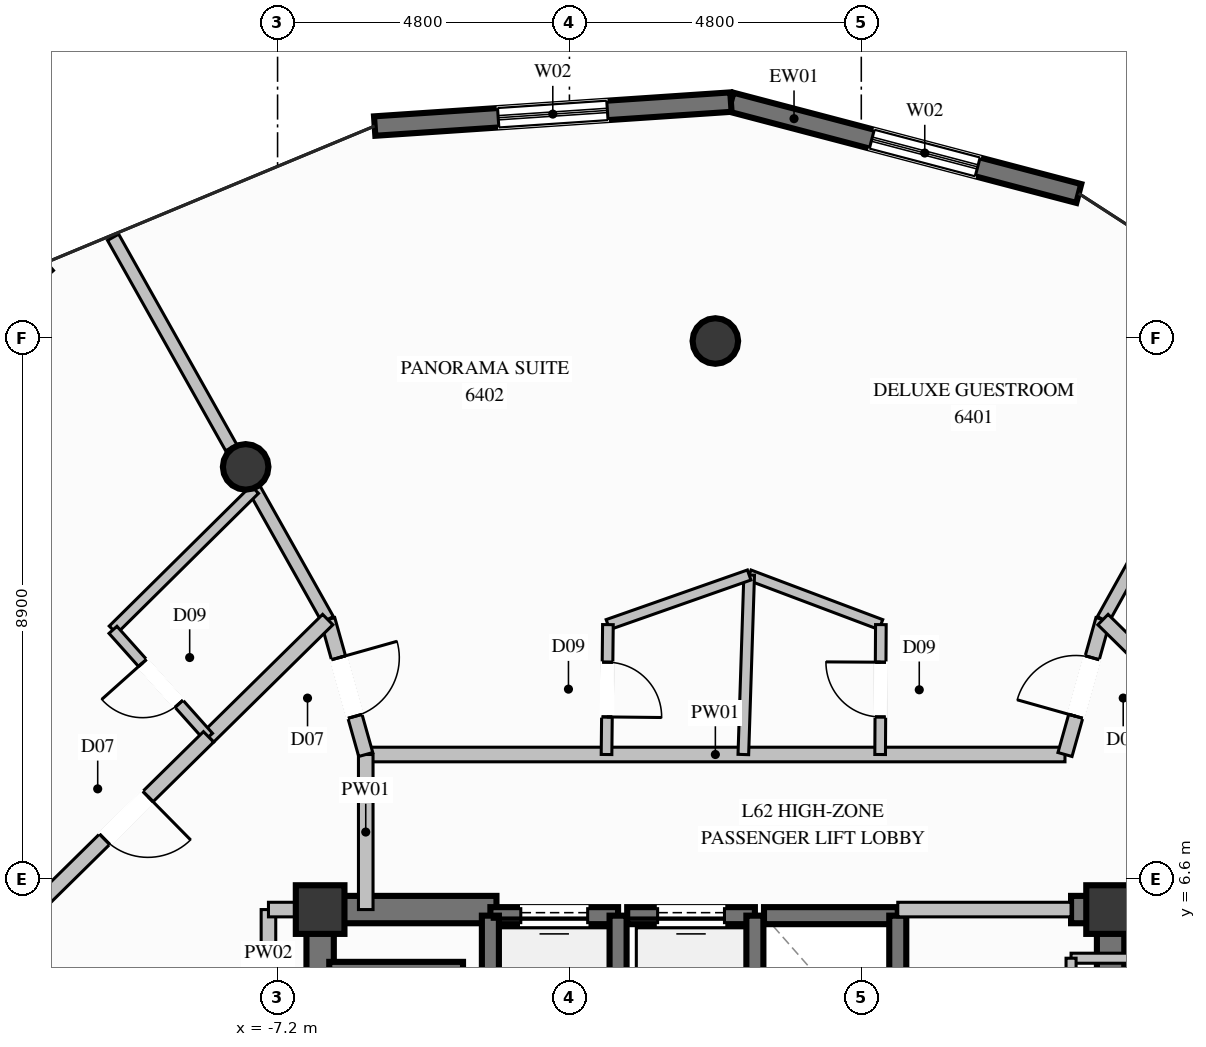
"""IFC4 building model, lengths in metres.
Left out: names, types, materials, properties, quantities, classifications, styles, units other than length and angle.
Written with IfcOpenShell. Run it as: python <this file> out.ifc"""

import sys

from ifc_helpers import new_model, si_unit, direction, frame, frame_2d, origin, origin_2d, place, context, subcontext, project, spatial, rectangle, circle, extrude, element, fill, save


model = new_model("IFC4")
c1 = context("Model", 3, precision=1e-05, world=origin(), true_north=direction((0.0, 1.0)))
c2 = subcontext(c1, "Body", "Model", "MODEL_VIEW")
j1 = project(units=[si_unit("LENGTHUNIT", "METRE"), si_unit("PLANEANGLEUNIT", "RADIAN")], contexts=[c1])
p1 = place(None, origin())
s1 = spatial("IfcSite", under=j1, at=p1, CompositionType="ELEMENT")
p2 = place(p1, origin())
s2 = spatial("IfcBuilding", under=s1, at=p2, CompositionType="ELEMENT")
p3 = place(p2, frame((0.0, 0.0, 239.2)))
s3 = spatial("IfcBuildingStorey", under=s2, at=p3, CompositionType="ELEMENT", Elevation=239.2)
for number, where, z_axis, x_axis in (
    (1, (6.5, 6.1, 0.0), (0.0, 0.0, 1.0), (1.0, 0.0, 0.0)),
    (2, (-6.5, 6.1, 0.0), (0.0, 0.0, 1.0), (1.0, 0.0, 0.0)),
):
    element("IfcColumn", number, at=place(p3, frame(where, z_axis=z_axis, x_axis=x_axis)), inside=s3, PredefinedType="COLUMN", context=c2, shape_type="SweptSolid", body=[
        extrude(rectangle(XDim=0.8, YDim=0.8, at=origin_2d()), origin(), (0.0, 0.0, 1.0), 3.8),
    ])
p4 = place(p3, frame((-6.275, 6.1, 0.0), z_axis=(0.0, 0.0, 1.0), x_axis=(1.0, 0.0, 0.0)))
e3 = element("IfcWall", 3, at=p4, inside=s3, PredefinedType="SHEAR", context=c2, shape_type="SweptSolid", body=[
    extrude(rectangle(XDim=2.675, YDim=0.45, at=frame_2d((1.337, 0.0))), origin(), (0.0, 0.0, 1.0), 3.8),
])
p5 = place(p3, frame((5.85, 6.1, 0.0), z_axis=(0.0, 0.0, 1.0), x_axis=(1.0, 0.0, 0.0)))
e4 = element("IfcWall", 4, at=p5, inside=s3, PredefinedType="SHEAR", context=c2, shape_type="SweptSolid", body=[
    extrude(rectangle(XDim=0.425, YDim=0.45, at=frame_2d((0.212, 0.0))), origin(), (0.0, 0.0, 1.0), 3.8),
])
p6 = place(p3, frame((-6.5, 2.35, 0.0), z_axis=(0.0, 0.0, 1.0), x_axis=(0.0, 1.0, 0.0)))
e5 = element("IfcWall", 5, at=p6, inside=s3, PredefinedType="SHEAR", context=c2, shape_type="SweptSolid", body=[
    extrude(rectangle(XDim=3.975, YDim=0.45, at=frame_2d((1.987, 0.0))), origin(), (0.0, 0.0, 1.0), 3.8),
])
p7 = place(p3, frame((6.5, 3.35, 0.0), z_axis=(0.0, 0.0, 1.0), x_axis=(0.0, 1.0, 0.0)))
e6 = element("IfcWall", 6, at=p7, inside=s3, PredefinedType="SHEAR", context=c2, shape_type="SweptSolid", body=[
    extrude(rectangle(XDim=2.975, YDim=0.45, at=frame_2d((1.487, 0.0))), origin(), (0.0, 0.0, 1.0), 3.8),
])
for number, where, z_axis, x_axis in (
    (7, (0.0, 15.45, 0.0), (0.0, 0.0, 1.0), (1.0, 0.0, 0.0)),
    (8, (-7.725, 13.38, 0.0), (0.0, 0.0, 1.0), (1.0, 0.0, 0.0)),
):
    element("IfcColumn", number, at=place(p3, frame(where, z_axis=z_axis, x_axis=x_axis)), inside=s3, PredefinedType="COLUMN", context=c2, shape_type="SweptSolid", body=[
        extrude(circle(Radius=0.375, at=origin_2d()), origin(), (0.0, 0.0, 1.0), 3.8),
    ])
p8 = place(p3, frame((0.256, 19.379, 0.0), z_axis=(0.0, 0.0, 1.0), x_axis=(0.967181914063, -0.254084917124, 0.0)))
e9 = element("IfcWall", 9, at=p8, inside=s3, PredefinedType="SOLIDWALL", context=c2, shape_type="SweptSolid", body=[
    extrude(rectangle(XDim=5.915, YDim=0.32, at=frame_2d((2.958, 0.0))), origin(), (0.0, 0.0, 1.0), 3.57),
])
p9 = place(p8, frame((2.396, 0.0, 0.35)))
e10 = element("IfcOpeningElement", 10, at=p9, cuts=e9, PredefinedType="OPENING", context=c2, shape_type="SweptSolid", body=[
    extrude(rectangle(XDim=1.8, YDim=2.6, at=frame_2d((0.9, 1.3))), frame((0.0, 0.17, 0.0), z_axis=(0.0, -1.0, 0.0), x_axis=(1.0, 0.0, 0.0)), (0.0, 0.0, 1.0), 0.34),
])
p10 = place(p3, frame((-5.603, 18.985, 0.0), z_axis=(0.0, 0.0, 1.0), x_axis=(0.997748955427, 0.067059838539, 0.0)))
e11 = element("IfcWall", 11, at=p10, inside=s3, PredefinedType="SOLIDWALL", context=c2, shape_type="SweptSolid", body=[
    extrude(rectangle(XDim=5.872, YDim=0.32, at=frame_2d((2.936, 0.0))), origin(), (0.0, 0.0, 1.0), 3.57),
])
p11 = place(p10, frame((2.036, 0.0, 0.35)))
e12 = element("IfcOpeningElement", 12, at=p11, cuts=e11, PredefinedType="OPENING", context=c2, shape_type="SweptSolid", body=[
    extrude(rectangle(XDim=1.8, YDim=2.6, at=frame_2d((0.9, 1.3))), frame((0.0, 0.17, 0.0), z_axis=(0.0, -1.0, 0.0), x_axis=(1.0, 0.0, 0.0)), (0.0, 0.0, 1.0), 0.34),
])
p12 = place(p3, frame((-1.6, 6.0, 0.0), z_axis=(0.0, 0.0, 1.0), x_axis=(-1.0, 0.0, 0.0)))
e13 = element("IfcWall", 13, at=p12, inside=s3, PredefinedType="SOLIDWALL", context=c2, shape_type="SweptSolid", body=[
    extrude(rectangle(XDim=2.1, YDim=0.28, at=frame_2d((1.05, 0.0))), origin(), (0.0, 0.0, 1.0), 3.57),
])
p13 = place(p12, frame((0.5, 0.0, 0.0)))
e14 = element("IfcOpeningElement", 14, at=p13, cuts=e13, PredefinedType="OPENING", context=c2, shape_type="SweptSolid", body=[
    extrude(rectangle(XDim=1.1, YDim=2.2, at=frame_2d((0.55, 1.1))), frame((0.0, 0.15, 0.0), z_axis=(0.0, -1.0, 0.0), x_axis=(1.0, 0.0, 0.0)), (0.0, 0.0, 1.0), 0.3),
])
for number, where, z_axis, x_axis in (
    (15, (-3.7, 6.0, 0.0), (0.0, 0.0, 1.0), (0.0, -1.0, 0.0)),
    (16, (-1.6, 3.5, 0.0), (0.0, 0.0, 1.0), (0.0, 1.0, 0.0)),
):
    element("IfcWall", number, at=place(p3, frame(where, z_axis=z_axis, x_axis=x_axis)), inside=s3, PredefinedType="SOLIDWALL", context=c2, shape_type="SweptSolid", body=[
        extrude(rectangle(XDim=2.5, YDim=0.28, at=frame_2d((1.25, 0.0))), origin(), (0.0, 0.0, 1.0), 3.57),
    ])
p14 = place(p3, frame((0.65, 6.0, 0.0), z_axis=(0.0, 0.0, 1.0), x_axis=(-1.0, 0.0, 0.0)))
e17 = element("IfcWall", 17, at=p14, inside=s3, PredefinedType="SOLIDWALL", context=c2, shape_type="SweptSolid", body=[
    extrude(rectangle(XDim=2.1, YDim=0.28, at=frame_2d((1.05, 0.0))), origin(), (0.0, 0.0, 1.0), 3.57),
])
p15 = place(p14, frame((0.5, 0.0, 0.0)))
e18 = element("IfcOpeningElement", 18, at=p15, cuts=e17, PredefinedType="OPENING", context=c2, shape_type="SweptSolid", body=[
    extrude(rectangle(XDim=1.1, YDim=2.2, at=frame_2d((0.55, 1.1))), frame((0.0, 0.15, 0.0), z_axis=(0.0, -1.0, 0.0), x_axis=(1.0, 0.0, 0.0)), (0.0, 0.0, 1.0), 0.3),
])
p16 = place(p3, frame((0.65, 3.5, 0.0), z_axis=(0.0, 0.0, 1.0), x_axis=(0.0, 1.0, 0.0)))
e19 = element("IfcWall", 19, at=p16, inside=s3, PredefinedType="SOLIDWALL", context=c2, shape_type="SweptSolid", body=[
    extrude(rectangle(XDim=2.5, YDim=0.28, at=frame_2d((1.25, 0.0))), origin(), (0.0, 0.0, 1.0), 3.57),
])
p17 = place(p3, frame((3.0, 6.0, 0.0), z_axis=(0.0, 0.0, 1.0), x_axis=(-1.0, 0.0, 0.0)))
e20 = element("IfcWall", 20, at=p17, inside=s3, PredefinedType="SOLIDWALL", context=c2, shape_type="SweptSolid", body=[
    extrude(rectangle(XDim=2.2, YDim=0.28, at=frame_2d((1.1, 0.0))), origin(), (0.0, 0.0, 1.0), 3.57),
])
p18 = place(p3, frame((3.0, 3.5, 0.0), z_axis=(0.0, 0.0, 1.0), x_axis=(0.0, 1.0, 0.0)))
e21 = element("IfcWall", 21, at=p18, inside=s3, PredefinedType="SOLIDWALL", context=c2, shape_type="SweptSolid", body=[
    extrude(rectangle(XDim=2.5, YDim=0.28, at=frame_2d((1.25, 0.0))), origin(), (0.0, 0.0, 1.0), 3.57),
])
p19 = place(p3, frame((-4.15, 5.1, 0.0), z_axis=(0.0, 0.0, 1.0), x_axis=(-1.0, 0.0, 0.0)))
e22 = element("IfcWall", 22, at=p19, inside=s3, PredefinedType="SOLIDWALL", context=c2, shape_type="SweptSolid", body=[
    extrude(rectangle(XDim=2.2, YDim=0.28, at=frame_2d((1.1, 0.0))), origin(), (0.0, 0.0, 1.0), 3.57),
])
p20 = place(p3, frame((-5.75, 8.65, 0.0), z_axis=(0.0, 0.0, 1.0), x_axis=(1.0, 0.0, 0.0)))
e23 = element("IfcWall", 23, at=p20, inside=s3, PredefinedType="PARTITIONING", context=c2, shape_type="SweptSolid", body=[
    extrude(rectangle(XDim=11.5, YDim=0.24, at=frame_2d((5.75, 0.0))), origin(), (0.0, 0.0, 1.0), 3.57),
])
p21 = place(p3, frame((3.0, 6.1, 0.0), z_axis=(0.0, 0.0, 1.0), x_axis=(1.0, 0.0, 0.0)))
e24 = element("IfcWall", 24, at=p21, inside=s3, PredefinedType="PARTITIONING", context=c2, shape_type="SweptSolid", body=[
    extrude(rectangle(XDim=2.85, YDim=0.24, at=frame_2d((1.425, 0.0))), origin(), (0.0, 0.0, 1.0), 2.655),
])
p22 = place(p3, frame((6.5, 6.1, 0.0), z_axis=(0.0, 0.0, 1.0), x_axis=(1.0, 0.0, 0.0)))
e25 = element("IfcWall", 25, at=p22, inside=s3, PredefinedType="PARTITIONING", context=c2, shape_type="SweptSolid", body=[
    extrude(rectangle(XDim=0.85, YDim=0.24, at=frame_2d((0.425, 0.0))), origin(), (0.0, 0.0, 1.0), 3.011),
])
p23 = place(p3, frame((-5.75, 6.1, 0.0), z_axis=(0.0, 0.0, 1.0), x_axis=(0.0, 1.0, 0.0)))
e26 = element("IfcWall", 26, at=p23, inside=s3, PredefinedType="PARTITIONING", context=c2, shape_type="SweptSolid", body=[
    extrude(rectangle(XDim=2.55, YDim=0.24, at=frame_2d((1.275, 0.0))), origin(), (0.0, 0.0, 1.0), 3.57),
])
p24 = place(p3, frame((-7.35, 4.95, 0.0), z_axis=(0.0, 0.0, 1.0), x_axis=(0.0, 1.0, 0.0)))
e27 = element("IfcWall", 27, at=p24, inside=s3, PredefinedType="PARTITIONING", context=c2, shape_type="SweptSolid", body=[
    extrude(rectangle(XDim=1.15, YDim=0.24, at=frame_2d((0.575, 0.0))), origin(), (0.0, 0.0, 1.0), 2.655),
])
p25 = place(p3, frame((-7.35, 6.1, 0.0), z_axis=(0.0, 0.0, 1.0), x_axis=(1.0, 0.0, 0.0)))
e28 = element("IfcWall", 28, at=p25, inside=s3, PredefinedType="PARTITIONING", context=c2, shape_type="SweptSolid", body=[
    extrude(rectangle(XDim=0.85, YDim=0.24, at=frame_2d((0.425, 0.0))), origin(), (0.0, 0.0, 1.0), 3.011),
])
p26 = place(p3, frame((7.35, 5.3, 0.0), z_axis=(0.0, 0.0, 1.0), x_axis=(-1.0, 0.0, 0.0)))
e29 = element("IfcWall", 29, at=p26, inside=s3, PredefinedType="PARTITIONING", context=c2, shape_type="SweptSolid", body=[
    extrude(rectangle(XDim=1.5, YDim=0.165, at=frame_2d((0.75, 0.0))), origin(), (0.0, 0.0, 1.0), 2.655),
])
p27 = place(p3, frame((5.85, 5.3, 0.0), z_axis=(0.0, 0.0, 1.0), x_axis=(0.0, -1.0, 0.0)))
e30 = element("IfcWall", 30, at=p27, inside=s3, PredefinedType="PARTITIONING", context=c2, shape_type="SweptSolid", body=[
    extrude(rectangle(XDim=2.55, YDim=0.165, at=frame_2d((1.275, 0.0))), origin(), (0.0, 0.0, 1.0), 2.655),
])
p28 = place(p3, frame((6.375, 10.869, 0.0), z_axis=(0.0, 0.0, 1.0), x_axis=(0.486620940413, 0.873613221255, 0.0)))
e31 = element("IfcWall", 31, at=p28, inside=s3, PredefinedType="PARTITIONING", context=c2, shape_type="SweptSolid", body=[
    extrude(rectangle(XDim=2.458, YDim=0.21, at=frame_2d((1.229, 0.0))), origin(), (0.0, 0.0, 1.0), 3.011),
])
p29 = place(p3, frame((-6.375, 10.869, 0.0), z_axis=(0.0, 0.0, 1.0), x_axis=(-0.489667191284, 0.871909422922, 0.0)))
e32 = element("IfcWall", 32, at=p29, inside=s3, PredefinedType="PARTITIONING", context=c2, shape_type="SweptSolid", body=[
    extrude(rectangle(XDim=2.459, YDim=0.21, at=frame_2d((1.229, 0.0))), origin(), (0.0, 0.0, 1.0), 3.011),
])
p30 = place(p3, frame((-7.962, 13.696, 0.0), z_axis=(0.0, 0.0, 1.0), x_axis=(-0.489665242016, 0.871910517634, 0.0)))
e33 = element("IfcWall", 33, at=p30, inside=s3, PredefinedType="PARTITIONING", context=c2, shape_type="SweptSolid", body=[
    extrude(rectangle(XDim=3.968, YDim=0.21, at=frame_2d((1.984, 0.0))), origin(), (0.0, 0.0, 1.0), 3.57),
])
p31 = place(p3, frame((0.556, 11.602, 0.0), z_axis=(0.0, 0.0, 1.0), x_axis=(0.935773181831, -0.35260254135, 0.0)))
e34 = element("IfcWall", 34, at=p31, inside=s3, PredefinedType="PLUMBINGWALL", context=c2, shape_type="SweptSolid", body=[
    extrude(rectangle(XDim=2.315, YDim=0.175, at=frame_2d((1.157, 0.0))), origin(), (0.0, 0.0, 1.0), 3.253),
])
p32 = place(p3, frame((0.556, 11.602, 0.0), z_axis=(0.0, 0.0, 1.0), x_axis=(-0.032483675207, -0.999472266171, 0.0)))
e35 = element("IfcWall", 35, at=p32, inside=s3, PredefinedType="PLUMBINGWALL", context=c2, shape_type="SweptSolid", body=[
    extrude(rectangle(XDim=2.954, YDim=0.175, at=frame_2d((1.477, 0.0))), origin(), (0.0, 0.0, 1.0), 3.57),
])
p33 = place(p3, frame((2.71, 8.65, 0.0), z_axis=(0.0, 0.0, 1.0), x_axis=(0.005600552237, 0.999984316784, 0.0)))
e36 = element("IfcWall", 36, at=p33, inside=s3, PredefinedType="PLUMBINGWALL", context=c2, shape_type="SweptSolid", body=[
    extrude(rectangle(XDim=2.136, YDim=0.175, at=frame_2d((1.068, 0.0))), origin(), (0.0, 0.0, 1.0), 3.57),
])
p34 = place(p33, frame((0.618, 0.0, 0.0)))
e37 = element("IfcOpeningElement", 37, at=p34, cuts=e36, PredefinedType="OPENING", context=c2, shape_type="SweptSolid", body=[
    extrude(rectangle(XDim=0.9, YDim=2.1, at=frame_2d((0.45, 1.05))), frame((0.0, 0.098, 0.0), z_axis=(0.0, -1.0, 0.0), x_axis=(1.0, 0.0, 0.0)), (0.0, 0.0, 1.0), 0.195),
])
p35 = place(p3, frame((5.75, 8.65, 0.0), z_axis=(0.0, 0.0, 1.0), x_axis=(0.271110513922, 0.962548226969, 0.0)))
e38 = element("IfcWall", 38, at=p35, inside=s3, PredefinedType="PARTITIONING", context=c2, shape_type="SweptSolid", body=[
    extrude(rectangle(XDim=2.305, YDim=0.24, at=frame_2d((1.153, 0.0))), origin(), (0.0, 0.0, 1.0), 3.57),
])
p36 = place(p35, frame((0.653, 0.0, 0.0)))
e39 = element("IfcOpeningElement", 39, at=p36, cuts=e38, PredefinedType="OPENING", context=c2, shape_type="SweptSolid", body=[
    extrude(rectangle(XDim=1.0, YDim=2.2, at=frame_2d((0.5, 1.1))), frame((0.0, 0.13, 0.0), z_axis=(0.0, -1.0, 0.0), x_axis=(1.0, 0.0, 0.0)), (0.0, 0.0, 1.0), 0.26),
])
p37 = place(p3, frame((-1.767, 10.786, 0.0), z_axis=(0.0, 0.0, 1.0), x_axis=(0.943463492061, 0.331476453385, 0.0)))
e40 = element("IfcWall", 40, at=p37, inside=s3, PredefinedType="PLUMBINGWALL", context=c2, shape_type="SweptSolid", body=[
    extrude(rectangle(XDim=2.462, YDim=0.175, at=frame_2d((1.231, 0.0))), origin(), (0.0, 0.0, 1.0), 3.253),
])
p38 = place(p3, frame((-1.767, 10.786, 0.0), z_axis=(0.0, 0.0, 1.0), x_axis=(-0.010743464968, -0.999942287315, 0.0)))
e41 = element("IfcWall", 41, at=p38, inside=s3, PredefinedType="PLUMBINGWALL", context=c2, shape_type="SweptSolid", body=[
    extrude(rectangle(XDim=2.136, YDim=0.175, at=frame_2d((1.068, 0.0))), origin(), (0.0, 0.0, 1.0), 3.57),
])
p39 = place(p38, frame((0.618, 0.0, 0.0)))
e42 = element("IfcOpeningElement", 42, at=p39, cuts=e41, PredefinedType="OPENING", context=c2, shape_type="SweptSolid", body=[
    extrude(rectangle(XDim=0.9, YDim=2.1, at=frame_2d((0.45, 1.05))), frame((0.0, 0.098, 0.0), z_axis=(0.0, -1.0, 0.0), x_axis=(1.0, 0.0, 0.0)), (0.0, 0.0, 1.0), 0.195),
])
p40 = place(p3, frame((-6.375, 10.869, 0.0), z_axis=(0.0, 0.0, 1.0), x_axis=(0.271110513922, -0.962548226969, 0.0)))
e43 = element("IfcWall", 43, at=p40, inside=s3, PredefinedType="PARTITIONING", context=c2, shape_type="SweptSolid", body=[
    extrude(rectangle(XDim=2.305, YDim=0.24, at=frame_2d((1.153, 0.0))), origin(), (0.0, 0.0, 1.0), 3.57),
])
p41 = place(p40, frame((0.653, 0.0, 0.0)))
e44 = element("IfcOpeningElement", 44, at=p41, cuts=e43, PredefinedType="OPENING", context=c2, shape_type="SweptSolid", body=[
    extrude(rectangle(XDim=1.0, YDim=2.2, at=frame_2d((0.5, 1.1))), frame((0.0, 0.13, 0.0), z_axis=(0.0, -1.0, 0.0), x_axis=(1.0, 0.0, 0.0)), (0.0, 0.0, 1.0), 0.26),
])
p42 = place(p3, frame((-6.375, 10.869, 0.0), z_axis=(0.0, 0.0, 1.0), x_axis=(-0.712721806089, -0.701446809904, 0.0)))
e45 = element("IfcWall", 45, at=p42, inside=s3, PredefinedType="PARTITIONING", context=c2, shape_type="SweptSolid", body=[
    extrude(rectangle(XDim=2.75, YDim=0.24, at=frame_2d((1.375, 0.0))), origin(), (0.0, 0.0, 1.0), 3.57),
])
p43 = place(p3, frame((-7.575, 13.007, 0.0), z_axis=(0.0, 0.0, 1.0), x_axis=(-0.710892186869, -0.703301001456, 0.0)))
e46 = element("IfcWall", 46, at=p43, inside=s3, PredefinedType="PLUMBINGWALL", context=c2, shape_type="SweptSolid", body=[
    extrude(rectangle(XDim=3.281, YDim=0.175, at=frame_2d((1.64, 0.0))), origin(), (0.0, 0.0, 1.0), 3.139),
])
p44 = place(p3, frame((-8.335, 8.94, 0.0), z_axis=(0.0, 0.0, 1.0), x_axis=(-0.666153503552, 0.745814661766, 0.0)))
e47 = element("IfcWall", 47, at=p44, inside=s3, PredefinedType="PLUMBINGWALL", context=c2, shape_type="SweptSolid", body=[
    extrude(rectangle(XDim=2.36, YDim=0.175, at=frame_2d((1.18, 0.0))), origin(), (0.0, 0.0, 1.0), 3.57),
])
p45 = place(p44, frame((0.73, 0.0, 0.0)))
e48 = element("IfcOpeningElement", 48, at=p45, cuts=e47, PredefinedType="OPENING", context=c2, shape_type="SweptSolid", body=[
    extrude(rectangle(XDim=0.9, YDim=2.1, at=frame_2d((0.45, 1.05))), frame((0.0, 0.098, 0.0), z_axis=(0.0, -1.0, 0.0), x_axis=(1.0, 0.0, 0.0)), (0.0, 0.0, 1.0), 0.195),
])
p46 = place(p3, frame((-8.335, 8.94, 0.0), z_axis=(0.0, 0.0, 1.0), x_axis=(-0.712612295011, -0.701558063883, 0.0)))
e49 = element("IfcWall", 49, at=p46, inside=s3, PredefinedType="PARTITIONING", context=c2, shape_type="SweptSolid", body=[
    extrude(rectangle(XDim=3.799, YDim=0.24, at=frame_2d((1.899, 0.0))), origin(), (0.0, 0.0, 1.0), 3.57),
])
p47 = place(p46, frame((1.399, 0.0, 0.0)))
e50 = element("IfcOpeningElement", 50, at=p47, cuts=e49, PredefinedType="OPENING", context=c2, shape_type="SweptSolid", body=[
    extrude(rectangle(XDim=1.0, YDim=2.2, at=frame_2d((0.5, 1.1))), frame((0.0, 0.13, 0.0), z_axis=(0.0, -1.0, 0.0), x_axis=(1.0, 0.0, 0.0)), (0.0, 0.0, 1.0), 0.26),
])
p48 = place(p3, frame((9.082, 8.204, 0.0), z_axis=(0.0, 0.0, 1.0), x_axis=(-0.712644426178, 0.70152542494, 0.0)))
e51 = element("IfcWall", 51, at=p48, inside=s3, PredefinedType="PARTITIONING", context=c2, shape_type="SweptSolid", body=[
    extrude(rectangle(XDim=3.799, YDim=0.24, at=frame_2d((1.899, 0.0))), origin(), (0.0, 0.0, 1.0), 3.57),
])
p49 = place(p48, frame((1.399, 0.0, 0.0)))
e52 = element("IfcOpeningElement", 52, at=p49, cuts=e51, PredefinedType="OPENING", context=c2, shape_type="SweptSolid", body=[
    extrude(rectangle(XDim=1.0, YDim=2.2, at=frame_2d((0.5, 1.1))), frame((0.0, 0.13, 0.0), z_axis=(0.0, -1.0, 0.0), x_axis=(1.0, 0.0, 0.0)), (0.0, 0.0, 1.0), 0.26),
])
p50 = place(p9, origin())
e53 = element("IfcWindow", 53, at=p50, inside=s3, PartitioningType="SINGLE_PANEL", PredefinedType="WINDOW", context=c2, shape_type="SweptSolid", body=[
    extrude(rectangle(XDim=1.8, YDim=2.6, at=frame_2d((0.9, 1.3))), frame((0.0, 0.03, 0.0), z_axis=(0.0, -1.0, 0.0), x_axis=(1.0, 0.0, 0.0)), (0.0, 0.0, 1.0), 0.06),
])
fill(e10, e53)
p51 = place(p11, origin())
e54 = element("IfcWindow", 54, at=p51, inside=s3, PartitioningType="SINGLE_PANEL", PredefinedType="WINDOW", context=c2, shape_type="SweptSolid", body=[
    extrude(rectangle(XDim=1.8, YDim=2.6, at=frame_2d((0.9, 1.3))), frame((0.0, 0.03, 0.0), z_axis=(0.0, -1.0, 0.0), x_axis=(1.0, 0.0, 0.0)), (0.0, 0.0, 1.0), 0.06),
])
fill(e12, e54)
p52 = place(p13, origin())
e55 = element("IfcDoor", 55, at=p52, inside=s3, OperationType="SLIDING_TO_LEFT", PredefinedType="DOOR", context=c2, shape_type="SweptSolid", body=[
    extrude(rectangle(XDim=1.1, YDim=2.2, at=frame_2d((0.55, 1.1))), frame((0.0, 0.025, 0.0), z_axis=(0.0, -1.0, 0.0), x_axis=(1.0, 0.0, 0.0)), (0.0, 0.0, 1.0), 0.05),
])
fill(e14, e55)
p53 = place(p15, origin())
e56 = element("IfcDoor", 56, at=p53, inside=s3, OperationType="SLIDING_TO_LEFT", PredefinedType="DOOR", context=c2, shape_type="SweptSolid", body=[
    extrude(rectangle(XDim=1.1, YDim=2.2, at=frame_2d((0.55, 1.1))), frame((0.0, 0.025, 0.0), z_axis=(0.0, -1.0, 0.0), x_axis=(1.0, 0.0, 0.0)), (0.0, 0.0, 1.0), 0.05),
])
fill(e18, e56)
p54 = place(p34, origin())
e57 = element("IfcDoor", 57, at=p54, inside=s3, OperationType="SINGLE_SWING_RIGHT", PredefinedType="DOOR", context=c2, shape_type="SweptSolid", body=[
    extrude(rectangle(XDim=0.9, YDim=2.1, at=frame_2d((0.45, 1.05))), frame((0.0, 0.025, 0.0), z_axis=(0.0, -1.0, 0.0), x_axis=(1.0, 0.0, 0.0)), (0.0, 0.0, 1.0), 0.05),
])
fill(e37, e57)
p55 = place(p36, origin())
e58 = element("IfcDoor", 58, at=p55, inside=s3, OperationType="SINGLE_SWING_LEFT", PredefinedType="DOOR", context=c2, shape_type="SweptSolid", body=[
    extrude(rectangle(XDim=1.0, YDim=2.2, at=frame_2d((0.5, 1.1))), frame((0.0, 0.025, 0.0), z_axis=(0.0, -1.0, 0.0), x_axis=(1.0, 0.0, 0.0)), (0.0, 0.0, 1.0), 0.05),
])
fill(e39, e58)
p56 = place(p39, origin())
e59 = element("IfcDoor", 59, at=p56, inside=s3, OperationType="SINGLE_SWING_RIGHT", PredefinedType="DOOR", context=c2, shape_type="SweptSolid", body=[
    extrude(rectangle(XDim=0.9, YDim=2.1, at=frame_2d((0.45, 1.05))), frame((0.0, 0.025, 0.0), z_axis=(0.0, -1.0, 0.0), x_axis=(1.0, 0.0, 0.0)), (0.0, 0.0, 1.0), 0.05),
])
fill(e42, e59)
p57 = place(p41, origin())
e60 = element("IfcDoor", 60, at=p57, inside=s3, OperationType="SINGLE_SWING_LEFT", PredefinedType="DOOR", context=c2, shape_type="SweptSolid", body=[
    extrude(rectangle(XDim=1.0, YDim=2.2, at=frame_2d((0.5, 1.1))), frame((0.0, 0.025, 0.0), z_axis=(0.0, -1.0, 0.0), x_axis=(1.0, 0.0, 0.0)), (0.0, 0.0, 1.0), 0.05),
])
fill(e44, e60)
p58 = place(p45, origin())
e61 = element("IfcDoor", 61, at=p58, inside=s3, OperationType="SINGLE_SWING_RIGHT", PredefinedType="DOOR", context=c2, shape_type="SweptSolid", body=[
    extrude(rectangle(XDim=0.9, YDim=2.1, at=frame_2d((0.45, 1.05))), frame((0.0, 0.025, 0.0), z_axis=(0.0, -1.0, 0.0), x_axis=(1.0, 0.0, 0.0)), (0.0, 0.0, 1.0), 0.05),
])
fill(e48, e61)
p59 = place(p47, origin())
e62 = element("IfcDoor", 62, at=p59, inside=s3, OperationType="SINGLE_SWING_LEFT", PredefinedType="DOOR", context=c2, shape_type="SweptSolid", body=[
    extrude(rectangle(XDim=1.0, YDim=2.2, at=frame_2d((0.5, 1.1))), frame((0.0, 0.025, 0.0), z_axis=(0.0, -1.0, 0.0), x_axis=(1.0, 0.0, 0.0)), (0.0, 0.0, 1.0), 0.05),
])
fill(e50, e62)
save(model, sys.argv[1])
